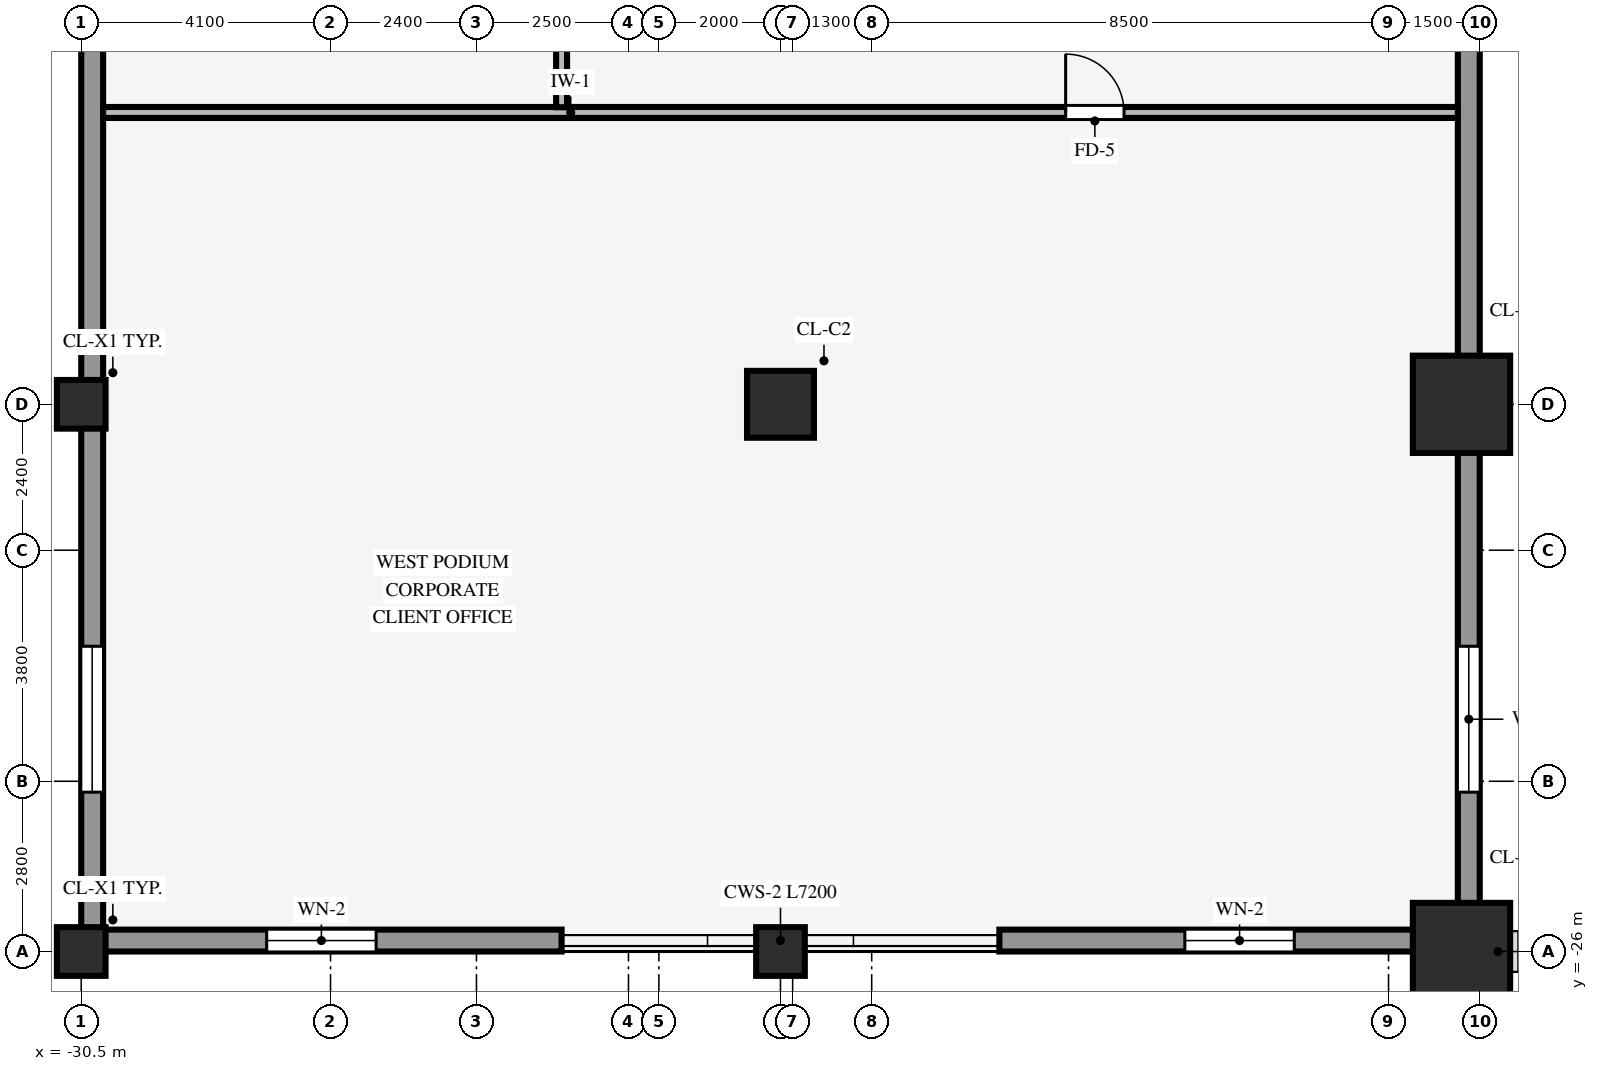
"""IFC4 building model, lengths in metres.
Left out: names, types, materials, properties, quantities, classifications, styles, units other than length and angle.
Written with IfcOpenShell. Run it as: python <this file> out.ifc"""

import sys

from ifc_helpers import new_model, si_unit, direction, frame, frame_2d, origin, origin_2d, place, context, subcontext, project, spatial, rectangle, hollow_rectangle, extrude, source, transform, mapped, element, fill, save


model = new_model("IFC4")
c1 = context("Model", 3, precision=1e-05, world=origin(), true_north=direction((0.0, 1.0)))
c2 = subcontext(c1, "Body", "Model", "MODEL_VIEW")
j1 = project(units=[si_unit("LENGTHUNIT", "METRE"), si_unit("PLANEANGLEUNIT", "RADIAN")], contexts=[c1])
p1 = place(None, origin())
s1 = spatial("IfcSite", under=j1, at=p1, CompositionType="ELEMENT")
p2 = place(p1, origin())
s2 = spatial("IfcBuilding", under=s1, at=p2, CompositionType="ELEMENT")
p3 = place(p2, frame((0.0, 0.0, 4.6)))
s3 = spatial("IfcBuildingStorey", under=s2, at=p3, CompositionType="ELEMENT", Elevation=4.6)
for number, where, z_axis, x_axis in (
    (1, (-7.8, -26.0, 0.0), (0.0, 0.0, 1.0), (1.0, 0.0, 0.0)),
    (2, (-7.8, -17.0, 0.0), (0.0, 0.0, 1.0), (1.0, 0.0, 0.0)),
):
    element("IfcColumn", number, at=place(p3, frame(where, z_axis=z_axis, x_axis=x_axis)), inside=s3, PredefinedType="COLUMN", context=c2, shape_type="SweptSolid", body=[
        extrude(rectangle(XDim=1.6, YDim=1.6, at=origin_2d()), origin(), (0.0, 0.0, 1.0), 4.28),
    ])
for number, where, z_axis, x_axis in (
    (3, (-30.5, -26.0, 0.0), (0.0, 0.0, 1.0), (1.0, 0.0, 0.0)),
    (4, (-30.5, -17.0, 0.0), (0.0, 0.0, 1.0), (1.0, 0.0, 0.0)),
    (5, (-19.0, -26.0, 0.0), (0.0, 0.0, 1.0), (1.0, 0.0, 0.0)),
):
    element("IfcColumn", number, at=place(p3, frame(where, z_axis=z_axis, x_axis=x_axis)), inside=s3, PredefinedType="COLUMN", context=c2, shape_type="SweptSolid", body=[
        extrude(hollow_rectangle(XDim=0.8, YDim=0.8, WallThickness=0.055, InnerFilletRadius=0.055, OuterFilletRadius=0.11, at=origin_2d()), origin(), (0.0, 0.0, 1.0), 4.28),
    ])
p4 = place(p3, frame((-19.0, -17.0, 0.0), z_axis=(0.0, 0.0, 1.0), x_axis=(1.0, 0.0, 0.0)))
e6 = element("IfcColumn", 6, at=p4, inside=s3, PredefinedType="COLUMN", context=c2, shape_type="SweptSolid", body=[
    extrude(rectangle(XDim=1.1, YDim=1.1, at=origin_2d()), origin(), (0.0, 0.0, 1.0), 4.28),
])
p5 = place(p3, frame((-30.5, -25.82, 0.0), z_axis=(0.0, 0.0, 1.0), x_axis=(1.0, 0.0, 0.0)))
e7 = element("IfcWall", 7, at=p5, inside=s3, PredefinedType="STANDARD", context=c2, shape_type="SweptSolid", body=[
    extrude(rectangle(XDim=7.9, YDim=0.36, at=frame_2d((3.95, 0.0))), origin(), (0.0, 0.0, 1.0), 3.615),
])
p6 = place(p5, frame((3.05, 0.0, 0.85)))
e8 = element("IfcOpeningElement", 8, at=p6, cuts=e7, PredefinedType="OPENING", context=c2, shape_type="SweptSolid", body=[
    extrude(rectangle(XDim=1.8, YDim=2.35, at=frame_2d((0.9, 1.175))), frame((0.0, 0.19, 0.0), z_axis=(0.0, -1.0, 0.0), x_axis=(1.0, 0.0, 0.0)), (0.0, 0.0, 1.0), 0.38),
])
p7 = place(p3, frame((-15.4, -25.82, 0.0), z_axis=(0.0, 0.0, 1.0), x_axis=(1.0, 0.0, 0.0)))
e9 = element("IfcWall", 9, at=p7, inside=s3, PredefinedType="STANDARD", context=c2, shape_type="SweptSolid", body=[
    extrude(rectangle(XDim=7.9, YDim=0.36, at=frame_2d((3.95, 0.0))), origin(), (0.0, 0.0, 1.0), 3.615),
])
p8 = place(p7, frame((3.05, 0.0, 0.85)))
e10 = element("IfcOpeningElement", 10, at=p8, cuts=e9, PredefinedType="OPENING", context=c2, shape_type="SweptSolid", body=[
    extrude(rectangle(XDim=1.8, YDim=2.35, at=frame_2d((0.9, 1.175))), frame((0.0, 0.19, 0.0), z_axis=(0.0, -1.0, 0.0), x_axis=(1.0, 0.0, 0.0)), (0.0, 0.0, 1.0), 0.38),
])
p9 = place(p3, frame((-7.68, -25.644, 0.0), z_axis=(0.0, 0.0, 1.0), x_axis=(0.0, 1.0, 0.0)))
e11 = element("IfcWall", 11, at=p9, inside=s3, PredefinedType="STANDARD", context=c2, shape_type="SweptSolid", body=[
    extrude(rectangle(XDim=51.288, YDim=0.36, at=frame_2d((25.644, 0.0))), origin(), (0.0, 0.0, 1.0), 3.649),
])
p10 = place(p9, frame((2.264, 0.0, 0.85)))
e12 = element("IfcOpeningElement", 12, at=p10, cuts=e11, PredefinedType="OPENING", context=c2, shape_type="SweptSolid", body=[
    extrude(rectangle(XDim=2.4, YDim=2.45, at=frame_2d((1.2, 1.225))), frame((0.0, 0.19, 0.0), z_axis=(0.0, -1.0, 0.0), x_axis=(1.0, 0.0, 0.0)), (0.0, 0.0, 1.0), 0.38),
])
p11 = place(p9, frame((17.051, 0.0, 0.85)))
e13 = element("IfcOpeningElement", 13, at=p11, cuts=e11, PredefinedType="OPENING", context=c2, shape_type="SweptSolid", body=[
    extrude(rectangle(XDim=2.4, YDim=2.45, at=frame_2d((1.2, 1.225))), frame((0.0, 0.19, 0.0), z_axis=(0.0, -1.0, 0.0), x_axis=(1.0, 0.0, 0.0)), (0.0, 0.0, 1.0), 0.38),
])
p12 = place(p9, frame((21.979, 0.0, 0.85)))
e14 = element("IfcOpeningElement", 14, at=p12, cuts=e11, PredefinedType="OPENING", context=c2, shape_type="SweptSolid", body=[
    extrude(rectangle(XDim=2.4, YDim=2.45, at=frame_2d((1.2, 1.225))), frame((0.0, 0.19, 0.0), z_axis=(0.0, -1.0, 0.0), x_axis=(1.0, 0.0, 0.0)), (0.0, 0.0, 1.0), 0.38),
])
p13 = place(p9, frame((26.908, 0.0, 0.85)))
e15 = element("IfcOpeningElement", 15, at=p13, cuts=e11, PredefinedType="OPENING", context=c2, shape_type="SweptSolid", body=[
    extrude(rectangle(XDim=2.4, YDim=2.45, at=frame_2d((1.2, 1.225))), frame((0.0, 0.19, 0.0), z_axis=(0.0, -1.0, 0.0), x_axis=(1.0, 0.0, 0.0)), (0.0, 0.0, 1.0), 0.38),
])
p14 = place(p9, frame((31.837, 0.0, 0.85)))
e16 = element("IfcOpeningElement", 16, at=p14, cuts=e11, PredefinedType="OPENING", context=c2, shape_type="SweptSolid", body=[
    extrude(rectangle(XDim=2.4, YDim=2.45, at=frame_2d((1.2, 1.225))), frame((0.0, 0.19, 0.0), z_axis=(0.0, -1.0, 0.0), x_axis=(1.0, 0.0, 0.0)), (0.0, 0.0, 1.0), 0.38),
])
p15 = place(p9, frame((46.624, 0.0, 0.85)))
e17 = element("IfcOpeningElement", 17, at=p15, cuts=e11, PredefinedType="OPENING", context=c2, shape_type="SweptSolid", body=[
    extrude(rectangle(XDim=2.4, YDim=2.45, at=frame_2d((1.2, 1.225))), frame((0.0, 0.19, 0.0), z_axis=(0.0, -1.0, 0.0), x_axis=(1.0, 0.0, 0.0)), (0.0, 0.0, 1.0), 0.38),
])
p16 = place(p3, frame((-30.32, -25.644, 0.0), z_axis=(0.0, 0.0, 1.0), x_axis=(0.0, 1.0, 0.0)))
e18 = element("IfcWall", 18, at=p16, inside=s3, PredefinedType="STANDARD", context=c2, shape_type="SweptSolid", body=[
    extrude(rectangle(XDim=51.288, YDim=0.36, at=frame_2d((25.644, 0.0))), origin(), (0.0, 0.0, 1.0), 3.615),
])
p17 = place(p16, frame((2.264, 0.0, 0.85)))
e19 = element("IfcOpeningElement", 19, at=p17, cuts=e18, PredefinedType="OPENING", context=c2, shape_type="SweptSolid", body=[
    extrude(rectangle(XDim=2.4, YDim=2.45, at=frame_2d((1.2, 1.225))), frame((0.0, 0.19, 0.0), z_axis=(0.0, -1.0, 0.0), x_axis=(1.0, 0.0, 0.0)), (0.0, 0.0, 1.0), 0.38),
])
p18 = place(p16, frame((17.051, 0.0, 0.85)))
e20 = element("IfcOpeningElement", 20, at=p18, cuts=e18, PredefinedType="OPENING", context=c2, shape_type="SweptSolid", body=[
    extrude(rectangle(XDim=2.4, YDim=2.45, at=frame_2d((1.2, 1.225))), frame((0.0, 0.19, 0.0), z_axis=(0.0, -1.0, 0.0), x_axis=(1.0, 0.0, 0.0)), (0.0, 0.0, 1.0), 0.38),
])
p19 = place(p16, frame((21.979, 0.0, 0.85)))
e21 = element("IfcOpeningElement", 21, at=p19, cuts=e18, PredefinedType="OPENING", context=c2, shape_type="SweptSolid", body=[
    extrude(rectangle(XDim=2.4, YDim=2.45, at=frame_2d((1.2, 1.225))), frame((0.0, 0.19, 0.0), z_axis=(0.0, -1.0, 0.0), x_axis=(1.0, 0.0, 0.0)), (0.0, 0.0, 1.0), 0.38),
])
p20 = place(p16, frame((26.908, 0.0, 0.85)))
e22 = element("IfcOpeningElement", 22, at=p20, cuts=e18, PredefinedType="OPENING", context=c2, shape_type="SweptSolid", body=[
    extrude(rectangle(XDim=2.4, YDim=2.45, at=frame_2d((1.2, 1.225))), frame((0.0, 0.19, 0.0), z_axis=(0.0, -1.0, 0.0), x_axis=(1.0, 0.0, 0.0)), (0.0, 0.0, 1.0), 0.38),
])
p21 = place(p16, frame((31.837, 0.0, 0.85)))
e23 = element("IfcOpeningElement", 23, at=p21, cuts=e18, PredefinedType="OPENING", context=c2, shape_type="SweptSolid", body=[
    extrude(rectangle(XDim=2.4, YDim=2.45, at=frame_2d((1.2, 1.225))), frame((0.0, 0.19, 0.0), z_axis=(0.0, -1.0, 0.0), x_axis=(1.0, 0.0, 0.0)), (0.0, 0.0, 1.0), 0.38),
])
p22 = place(p16, frame((46.624, 0.0, 0.85)))
e24 = element("IfcOpeningElement", 24, at=p22, cuts=e18, PredefinedType="OPENING", context=c2, shape_type="SweptSolid", body=[
    extrude(rectangle(XDim=2.4, YDim=2.45, at=frame_2d((1.2, 1.225))), frame((0.0, 0.19, 0.0), z_axis=(0.0, -1.0, 0.0), x_axis=(1.0, 0.0, 0.0)), (0.0, 0.0, 1.0), 0.38),
])
p23 = place(p3, frame((-30.14, -12.2, 0.0), z_axis=(0.0, 0.0, 1.0), x_axis=(1.0, 0.0, 0.0)))
e25 = element("IfcWall", 25, at=p23, inside=s3, PredefinedType="PARTITIONING", context=c2, shape_type="SweptSolid", body=[
    extrude(rectangle(XDim=22.28, YDim=0.18, at=frame_2d((11.14, 0.0))), origin(), (0.0, 0.0, 1.0), 4.27),
])
p24 = place(p23, frame((15.83, 0.0, 0.0)))
e26 = element("IfcOpeningElement", 26, at=p24, cuts=e25, PredefinedType="OPENING", context=c2, shape_type="SweptSolid", body=[
    extrude(rectangle(XDim=0.96, YDim=2.1, at=frame_2d((0.48, 1.05))), frame((0.0, 0.1, 0.0), z_axis=(0.0, -1.0, 0.0), x_axis=(1.0, 0.0, 0.0)), (0.0, 0.0, 1.0), 0.2),
])
p25 = place(p3, frame((-22.6, -12.114, 0.0), z_axis=(0.0, 0.0, 1.0), x_axis=(0.0, 1.0, 0.0)))
e27 = element("IfcWall", 27, at=p25, inside=s3, PredefinedType="PARTITIONING", context=c2, shape_type="SweptSolid", body=[
    extrude(rectangle(XDim=37.919, YDim=0.18, at=frame_2d((18.959, 0.0))), origin(), (0.0, 0.0, 1.0), 4.27),
])
p26 = place(p25, frame((11.634, 0.0, 0.0)))
e28 = element("IfcOpeningElement", 28, at=p26, cuts=e27, PredefinedType="OPENING", context=c2, shape_type="SweptSolid", body=[
    extrude(rectangle(XDim=0.96, YDim=2.1, at=frame_2d((0.48, 1.05))), frame((0.0, 0.1, 0.0), z_axis=(0.0, -1.0, 0.0), x_axis=(1.0, 0.0, 0.0)), (0.0, 0.0, 1.0), 0.2),
])
p27 = place(p25, frame((29.534, 0.0, 0.0)))
e29 = element("IfcOpeningElement", 29, at=p27, cuts=e27, PredefinedType="OPENING", context=c2, shape_type="SweptSolid", body=[
    extrude(rectangle(XDim=0.96, YDim=2.1, at=frame_2d((0.48, 1.05))), frame((0.0, 0.1, 0.0), z_axis=(0.0, -1.0, 0.0), x_axis=(1.0, 0.0, 0.0)), (0.0, 0.0, 1.0), 0.2),
])
m1 = source(origin(), c2, "Body", "SweptSolid", [
    extrude(rectangle(XDim=1.8, YDim=2.35, at=frame_2d((0.9, 1.175))), frame((0.0, 0.03, 0.0), z_axis=(0.0, -1.0, 0.0), x_axis=(1.0, 0.0, 0.0)), (0.0, 0.0, 1.0), 0.06),
])
p28 = place(p6, origin())
e30 = element("IfcWindow", 30, at=p28, inside=s3, PartitioningType="SINGLE_PANEL", PredefinedType="WINDOW", context=c2, shape_type="MappedRepresentation", body=[
    mapped(m1, transform((0.0, 0.0, 0.0), scale=1.0)),
])
fill(e8, e30)
p29 = place(p8, origin())
e31 = element("IfcWindow", 31, at=p29, inside=s3, PartitioningType="SINGLE_PANEL", PredefinedType="WINDOW", context=c2, shape_type="MappedRepresentation", body=[
    mapped(m1, transform((0.0, 0.0, 0.0), scale=1.0)),
])
fill(e10, e31)
m2 = source(origin(), c2, "Body", "SweptSolid", [
    extrude(rectangle(XDim=2.4, YDim=2.45, at=frame_2d((1.2, 1.225))), frame((0.0, 0.03, 0.0), z_axis=(0.0, -1.0, 0.0), x_axis=(1.0, 0.0, 0.0)), (0.0, 0.0, 1.0), 0.06),
])
p30 = place(p10, origin())
e32 = element("IfcWindow", 32, at=p30, inside=s3, PartitioningType="SINGLE_PANEL", PredefinedType="WINDOW", context=c2, shape_type="MappedRepresentation", body=[
    mapped(m2, transform((0.0, 0.0, 0.0), scale=1.0)),
])
fill(e12, e32)
p31 = place(p17, origin())
e33 = element("IfcWindow", 33, at=p31, inside=s3, PartitioningType="SINGLE_PANEL", PredefinedType="WINDOW", context=c2, shape_type="MappedRepresentation", body=[
    mapped(m2, transform((0.0, 0.0, 0.0), scale=1.0)),
])
fill(e19, e33)
m3 = source(origin(), c2, "Body", "SweptSolid", [
    extrude(rectangle(XDim=0.96, YDim=2.1, at=frame_2d((0.48, 1.05))), frame((0.0, 0.025, 0.0), z_axis=(0.0, -1.0, 0.0), x_axis=(1.0, 0.0, 0.0)), (0.0, 0.0, 1.0), 0.05),
])
p32 = place(p24, origin())
e34 = element("IfcDoor", 34, at=p32, inside=s3, OperationType="SINGLE_SWING_LEFT", PredefinedType="DOOR", context=c2, shape_type="MappedRepresentation", body=[
    mapped(m3, transform((0.0, 0.0, 0.0), scale=1.0)),
])
fill(e26, e34)
save(model, sys.argv[1])
